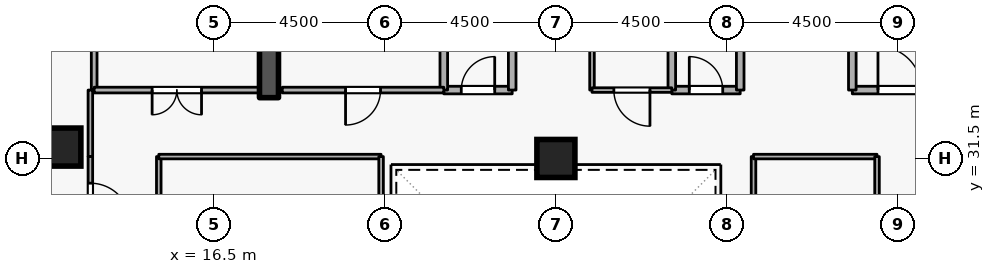
"""IFC4 building model, lengths in metres.
Left out: names, types, materials, properties, quantities, classifications, styles, units other than length and angle.
Written with IfcOpenShell. Run it as: python <this file> out.ifc"""

import sys

from ifc_helpers import new_model, si_unit, direction, frame, frame_2d, origin, origin_2d, place, context, subcontext, project, spatial, rectangle, extrude, element, fill, save


model = new_model("IFC4")
c1 = context("Model", 3, precision=1e-05, world=origin(), true_north=direction((0.0, 1.0)))
c2 = subcontext(c1, "Body", "Model", "MODEL_VIEW")
j1 = project(units=[si_unit("LENGTHUNIT", "METRE"), si_unit("PLANEANGLEUNIT", "RADIAN")], contexts=[c1])
p1 = place(None, origin())
s1 = spatial("IfcSite", under=j1, at=p1, CompositionType="ELEMENT")
p2 = place(p1, origin())
s2 = spatial("IfcBuilding", under=s1, at=p2, CompositionType="ELEMENT")
p3 = place(p2, frame((0.0, 0.0, 236.7)))
s3 = spatial("IfcBuildingStorey", under=s2, at=p3, CompositionType="ELEMENT", Elevation=236.7)
p4 = place(p3, frame((17.95, 33.1, 0.0), z_axis=(0.0, 0.0, 1.0), x_axis=(0.0, 1.0, 0.0)))
e1 = element("IfcWall", 1, at=p4, inside=s3, PredefinedType="SHEAR", context=c2, shape_type="SweptSolid", body=[
    extrude(rectangle(XDim=5.8, YDim=0.5, at=frame_2d((2.9, 0.0))), origin(), (0.0, 0.0, 1.0), 3.6),
])
for number, where, z_axis, x_axis in (
    (2, (12.5, 31.8, 0.0), (0.0, 0.0, 1.0), (1.0, 0.0, 0.0)),
    (3, (25.5, 31.5, 0.0), (0.0, 0.0, 1.0), (1.0, 0.0, 0.0)),
):
    element("IfcColumn", number, at=place(p3, frame(where, z_axis=z_axis, x_axis=x_axis)), inside=s3, PredefinedType="COLUMN", context=c2, shape_type="SweptSolid", body=[
        extrude(rectangle(XDim=1.0, YDim=1.0, at=origin_2d()), origin(), (0.0, 0.0, 1.0), 3.6),
    ])
p5 = place(p3, frame((33.3, 33.3, 0.0), z_axis=(0.0, 0.0, 1.0), x_axis=(1.0, 0.0, 0.0)))
e4 = element("IfcWall", 4, at=p5, inside=s3, PredefinedType="STANDARD", context=c2, shape_type="SweptSolid", body=[
    extrude(rectangle(XDim=2.5, YDim=0.2, at=frame_2d((1.25, 0.0))), origin(), (0.0, 0.0, 1.0), 3.34),
])
p6 = place(p5, frame((0.675, 0.0, 0.0)))
e5 = element("IfcOpeningElement", 5, at=p6, cuts=e4, PredefinedType="OPENING", context=c2, shape_type="SweptSolid", body=[
    extrude(rectangle(XDim=1.15, YDim=2.1, at=frame_2d((0.575, 1.05))), frame((0.0, 0.11, 0.0), z_axis=(0.0, -1.0, 0.0), x_axis=(1.0, 0.0, 0.0)), (0.0, 0.0, 1.0), 0.22),
])
p7 = place(p3, frame((33.3, 35.6, 0.0), z_axis=(0.0, 0.0, 1.0), x_axis=(0.0, -1.0, 0.0)))
e6 = element("IfcWall", 6, at=p7, inside=s3, PredefinedType="STANDARD", context=c2, shape_type="SweptSolid", body=[
    extrude(rectangle(XDim=2.3, YDim=0.2, at=frame_2d((1.15, 0.0))), origin(), (0.0, 0.0, 1.0), 2.545),
])
p8 = place(p3, frame((22.55, 33.3, 0.0), z_axis=(0.0, 0.0, 1.0), x_axis=(1.0, 0.0, 0.0)))
e7 = element("IfcWall", 7, at=p8, inside=s3, PredefinedType="STANDARD", context=c2, shape_type="SweptSolid", body=[
    extrude(rectangle(XDim=1.8, YDim=0.2, at=frame_2d((0.9, 0.0))), origin(), (0.0, 0.0, 1.0), 3.34),
])
p9 = place(p8, frame((0.46, 0.0, 0.0)))
e8 = element("IfcOpeningElement", 8, at=p9, cuts=e7, PredefinedType="OPENING", context=c2, shape_type="SweptSolid", body=[
    extrude(rectangle(XDim=0.88, YDim=2.04, at=frame_2d((0.44, 1.02))), frame((0.0, 0.11, 0.0), z_axis=(0.0, -1.0, 0.0), x_axis=(1.0, 0.0, 0.0)), (0.0, 0.0, 1.0), 0.22),
])
for number, where, z_axis, x_axis in (
    (9, (24.35, 33.3, 0.0), (0.0, 0.0, 1.0), (0.0, 1.0, 0.0)),
    (10, (22.55, 35.35, 0.0), (0.0, 0.0, 1.0), (0.0, -1.0, 0.0)),
):
    element("IfcWall", number, at=place(p3, frame(where, z_axis=z_axis, x_axis=x_axis)), inside=s3, PredefinedType="STANDARD", context=c2, shape_type="SweptSolid", body=[
        extrude(rectangle(XDim=2.05, YDim=0.2, at=frame_2d((1.025, 0.0))), origin(), (0.0, 0.0, 1.0), 3.34),
    ])
p10 = place(p3, frame((28.55, 33.3, 0.0), z_axis=(0.0, 0.0, 1.0), x_axis=(1.0, 0.0, 0.0)))
e11 = element("IfcWall", 11, at=p10, inside=s3, PredefinedType="STANDARD", context=c2, shape_type="SweptSolid", body=[
    extrude(rectangle(XDim=1.8, YDim=0.2, at=frame_2d((0.9, 0.0))), origin(), (0.0, 0.0, 1.0), 3.34),
])
p11 = place(p10, frame((0.46, 0.0, 0.0)))
e12 = element("IfcOpeningElement", 12, at=p11, cuts=e11, PredefinedType="OPENING", context=c2, shape_type="SweptSolid", body=[
    extrude(rectangle(XDim=0.88, YDim=2.04, at=frame_2d((0.44, 1.02))), frame((0.0, 0.11, 0.0), z_axis=(0.0, -1.0, 0.0), x_axis=(1.0, 0.0, 0.0)), (0.0, 0.0, 1.0), 0.22),
])
for number, where, z_axis, x_axis in (
    (13, (30.35, 33.3, 0.0), (0.0, 0.0, 1.0), (0.0, 1.0, 0.0)),
    (14, (28.55, 35.35, 0.0), (0.0, 0.0, 1.0), (0.0, -1.0, 0.0)),
):
    element("IfcWall", number, at=place(p3, frame(where, z_axis=z_axis, x_axis=x_axis)), inside=s3, PredefinedType="STANDARD", context=c2, shape_type="SweptSolid", body=[
        extrude(rectangle(XDim=2.05, YDim=0.2, at=frame_2d((1.025, 0.0))), origin(), (0.0, 0.0, 1.0), 3.34),
    ])
p12 = place(p3, frame((22.55, 33.3, 0.0), z_axis=(0.0, 0.0, 1.0), x_axis=(-1.0, 0.0, 0.0)))
e15 = element("IfcWall", 15, at=p12, inside=s3, PredefinedType="PARTITIONING", context=c2, shape_type="SweptSolid", body=[
    extrude(rectangle(XDim=4.25, YDim=0.15, at=frame_2d((2.125, 0.0))), origin(), (0.0, 0.0, 1.0), 3.34),
])
p13 = place(p12, frame((1.665, 0.0, 0.0)))
e16 = element("IfcOpeningElement", 16, at=p13, cuts=e15, PredefinedType="OPENING", context=c2, shape_type="SweptSolid", body=[
    extrude(rectangle(XDim=0.92, YDim=2.08, at=frame_2d((0.46, 1.04))), frame((0.0, 0.085, 0.0), z_axis=(0.0, -1.0, 0.0), x_axis=(1.0, 0.0, 0.0)), (0.0, 0.0, 1.0), 0.17),
])
p14 = place(p3, frame((26.45, 33.3, 0.0), z_axis=(0.0, 0.0, 1.0), x_axis=(0.0, 1.0, 0.0)))
e17 = element("IfcWall", 17, at=p14, inside=s3, PredefinedType="PARTITIONING", context=c2, shape_type="SweptSolid", body=[
    extrude(rectangle(XDim=2.05, YDim=0.12, at=frame_2d((1.025, 0.0))), origin(), (0.0, 0.0, 1.0), 3.34),
])
p15 = place(p3, frame((28.55, 33.3, 0.0), z_axis=(0.0, 0.0, 1.0), x_axis=(-1.0, 0.0, 0.0)))
e18 = element("IfcWall", 18, at=p15, inside=s3, PredefinedType="PARTITIONING", context=c2, shape_type="SweptSolid", body=[
    extrude(rectangle(XDim=2.1, YDim=0.12, at=frame_2d((1.05, 0.0))), origin(), (0.0, 0.0, 1.0), 3.34),
])
p16 = place(p15, frame((0.575, 0.0, 0.0)))
e19 = element("IfcOpeningElement", 19, at=p16, cuts=e18, PredefinedType="OPENING", context=c2, shape_type="SweptSolid", body=[
    extrude(rectangle(XDim=0.95, YDim=2.1, at=frame_2d((0.475, 1.05))), frame((0.0, 0.07, 0.0), z_axis=(0.0, -1.0, 0.0), x_axis=(1.0, 0.0, 0.0)), (0.0, 0.0, 1.0), 0.14),
])
p17 = place(p3, frame((13.35, 33.3, 0.0), z_axis=(0.0, 0.0, 1.0), x_axis=(0.0, 1.0, 0.0)))
e20 = element("IfcWall", 20, at=p17, inside=s3, PredefinedType="PARTITIONING", context=c2, shape_type="SweptSolid", body=[
    extrude(rectangle(XDim=11.42, YDim=0.15, at=frame_2d((5.71, 0.0))), origin(), (0.0, 0.0, 1.0), 3.34),
])
p18 = place(p3, frame((17.7, 33.3, 0.0), z_axis=(0.0, 0.0, 1.0), x_axis=(-1.0, 0.0, 0.0)))
e21 = element("IfcWall", 21, at=p18, inside=s3, PredefinedType="PARTITIONING", context=c2, shape_type="SweptSolid", body=[
    extrude(rectangle(XDim=4.35, YDim=0.15, at=frame_2d((2.175, 0.0))), origin(), (0.0, 0.0, 1.0), 3.34),
])
p19 = place(p18, frame((1.525, 0.0, 0.0)))
e22 = element("IfcOpeningElement", 22, at=p19, cuts=e21, PredefinedType="OPENING", context=c2, shape_type="SweptSolid", body=[
    extrude(rectangle(XDim=1.3, YDim=2.12, at=frame_2d((0.65, 1.06))), frame((0.0, 0.085, 0.0), z_axis=(0.0, -1.0, 0.0), x_axis=(1.0, 0.0, 0.0)), (0.0, 0.0, 1.0), 0.17),
])
p20 = place(p3, frame((13.25, 33.3, 0.0), z_axis=(0.0, 0.0, 1.0), x_axis=(0.0, -1.0, 0.0)))
e23 = element("IfcWall", 23, at=p20, inside=s3, PredefinedType="PARTITIONING", context=c2, shape_type="SweptSolid", body=[
    extrude(rectangle(XDim=1.75, YDim=0.12, at=frame_2d((0.875, 0.0))), origin(), (0.0, 0.0, 1.0), 3.34),
])
p21 = place(p3, frame((13.25, 31.55, 0.0), z_axis=(0.0, 0.0, 1.0), x_axis=(0.0, -1.0, 0.0)))
e24 = element("IfcWall", 24, at=p21, inside=s3, PredefinedType="PARTITIONING", context=c2, shape_type="SweptSolid", body=[
    extrude(rectangle(XDim=2.45, YDim=0.12, at=frame_2d((1.225, 0.0))), origin(), (0.0, 0.0, 1.0), 3.34),
])
p22 = place(p21, frame((0.7, 0.0, 0.0)))
e25 = element("IfcOpeningElement", 25, at=p22, cuts=e24, PredefinedType="OPENING", context=c2, shape_type="SweptSolid", body=[
    extrude(rectangle(XDim=1.05, YDim=2.1, at=frame_2d((0.525, 1.05))), frame((0.0, 0.07, 0.0), z_axis=(0.0, -1.0, 0.0), x_axis=(1.0, 0.0, 0.0)), (0.0, 0.0, 1.0), 0.14),
])
p23 = place(p3, frame((15.05, 22.45, 0.0), z_axis=(0.0, 0.0, 1.0), x_axis=(0.0, 1.0, 0.0)))
e26 = element("IfcWall", 26, at=p23, inside=s3, PredefinedType="PARTITIONING", context=c2, shape_type="SweptSolid", body=[
    extrude(rectangle(XDim=9.1, YDim=0.12, at=frame_2d((4.55, 0.0))), origin(), (0.0, 0.0, 1.0), 3.34),
])
p24 = place(p23, frame((4.075, 0.0, 0.0)))
e27 = element("IfcOpeningElement", 27, at=p24, cuts=e26, PredefinedType="OPENING", context=c2, shape_type="SweptSolid", body=[
    extrude(rectangle(XDim=0.95, YDim=2.1, at=frame_2d((0.475, 1.05))), frame((0.0, 0.07, 0.0), z_axis=(0.0, -1.0, 0.0), x_axis=(1.0, 0.0, 0.0)), (0.0, 0.0, 1.0), 0.14),
])
p25 = place(p3, frame((15.05, 31.55, 0.0), z_axis=(0.0, 0.0, 1.0), x_axis=(1.0, 0.0, 0.0)))
e28 = element("IfcWall", 28, at=p25, inside=s3, PredefinedType="PARTITIONING", context=c2, shape_type="SweptSolid", body=[
    extrude(rectangle(XDim=5.85, YDim=0.12, at=frame_2d((2.925, 0.0))), origin(), (0.0, 0.0, 1.0), 3.34),
])
for number, where, z_axis, x_axis in (
    (29, (20.9, 31.55, 0.0), (0.0, 0.0, 1.0), (0.0, -1.0, 0.0)),
    (30, (30.7, 22.45, 0.0), (0.0, 0.0, 1.0), (0.0, 1.0, 0.0)),
):
    element("IfcWall", number, at=place(p3, frame(where, z_axis=z_axis, x_axis=x_axis)), inside=s3, PredefinedType="PARTITIONING", context=c2, shape_type="SweptSolid", body=[
        extrude(rectangle(XDim=9.1, YDim=0.12, at=frame_2d((4.55, 0.0))), origin(), (0.0, 0.0, 1.0), 3.34),
    ])
p26 = place(p3, frame((30.7, 31.55, 0.0), z_axis=(0.0, 0.0, 1.0), x_axis=(1.0, 0.0, 0.0)))
e31 = element("IfcWall", 31, at=p26, inside=s3, PredefinedType="PARTITIONING", context=c2, shape_type="SweptSolid", body=[
    extrude(rectangle(XDim=3.25, YDim=0.12, at=frame_2d((1.625, 0.0))), origin(), (0.0, 0.0, 1.0), 3.34),
])
p27 = place(p3, frame((33.95, 31.55, 0.0), z_axis=(0.0, 0.0, 1.0), x_axis=(0.0, -1.0, 0.0)))
e32 = element("IfcWall", 32, at=p27, inside=s3, PredefinedType="PARTITIONING", context=c2, shape_type="SweptSolid", body=[
    extrude(rectangle(XDim=9.1, YDim=0.12, at=frame_2d((4.55, 0.0))), origin(), (0.0, 0.0, 1.0), 3.34),
])
p28 = place(p27, frame((4.075, 0.0, 0.0)))
e33 = element("IfcOpeningElement", 33, at=p28, cuts=e32, PredefinedType="OPENING", context=c2, shape_type="SweptSolid", body=[
    extrude(rectangle(XDim=0.95, YDim=2.1, at=frame_2d((0.475, 1.05))), frame((0.0, 0.07, 0.0), z_axis=(0.0, -1.0, 0.0), x_axis=(1.0, 0.0, 0.0)), (0.0, 0.0, 1.0), 0.14),
])
p29 = place(p6, origin())
e34 = element("IfcDoor", 34, at=p29, inside=s3, OperationType="SINGLE_SWING_LEFT", PredefinedType="DOOR", context=c2, shape_type="SweptSolid", body=[
    extrude(rectangle(XDim=1.15, YDim=2.1, at=frame_2d((0.575, 1.05))), frame((0.0, 0.025, 0.0), z_axis=(0.0, -1.0, 0.0), x_axis=(1.0, 0.0, 0.0)), (0.0, 0.0, 1.0), 0.05),
])
fill(e5, e34)
p30 = place(p9, origin())
e35 = element("IfcDoor", 35, at=p30, inside=s3, OperationType="SINGLE_SWING_RIGHT", PredefinedType="DOOR", context=c2, shape_type="SweptSolid", body=[
    extrude(rectangle(XDim=0.88, YDim=2.04, at=frame_2d((0.44, 1.02))), frame((0.0, 0.025, 0.0), z_axis=(0.0, -1.0, 0.0), x_axis=(1.0, 0.0, 0.0)), (0.0, 0.0, 1.0), 0.05),
])
fill(e8, e35)
p31 = place(p11, origin())
e36 = element("IfcDoor", 36, at=p31, inside=s3, OperationType="SINGLE_SWING_LEFT", PredefinedType="DOOR", context=c2, shape_type="SweptSolid", body=[
    extrude(rectangle(XDim=0.88, YDim=2.04, at=frame_2d((0.44, 1.02))), frame((0.0, 0.025, 0.0), z_axis=(0.0, -1.0, 0.0), x_axis=(1.0, 0.0, 0.0)), (0.0, 0.0, 1.0), 0.05),
])
fill(e12, e36)
p32 = place(p13, origin())
e37 = element("IfcDoor", 37, at=p32, inside=s3, OperationType="SINGLE_SWING_RIGHT", PredefinedType="DOOR", context=c2, shape_type="SweptSolid", body=[
    extrude(rectangle(XDim=0.92, YDim=2.08, at=frame_2d((0.46, 1.04))), frame((0.0, 0.025, 0.0), z_axis=(0.0, -1.0, 0.0), x_axis=(1.0, 0.0, 0.0)), (0.0, 0.0, 1.0), 0.05),
])
fill(e16, e37)
p33 = place(p16, origin())
e38 = element("IfcDoor", 38, at=p33, inside=s3, OperationType="SINGLE_SWING_LEFT", PredefinedType="DOOR", context=c2, shape_type="SweptSolid", body=[
    extrude(rectangle(XDim=0.95, YDim=2.1, at=frame_2d((0.475, 1.05))), frame((0.0, 0.025, 0.0), z_axis=(0.0, -1.0, 0.0), x_axis=(1.0, 0.0, 0.0)), (0.0, 0.0, 1.0), 0.05),
])
fill(e19, e38)
p34 = place(p19, origin())
e39 = element("IfcDoor", 39, at=p34, inside=s3, OperationType="DOUBLE_DOOR_SINGLE_SWING", PredefinedType="DOOR", context=c2, shape_type="SweptSolid", body=[
    extrude(rectangle(XDim=1.3, YDim=2.12, at=frame_2d((0.65, 1.06))), frame((0.0, 0.025, 0.0), z_axis=(0.0, -1.0, 0.0), x_axis=(1.0, 0.0, 0.0)), (0.0, 0.0, 1.0), 0.05),
])
fill(e22, e39)
p35 = place(p22, origin())
e40 = element("IfcDoor", 40, at=p35, inside=s3, OperationType="SINGLE_SWING_RIGHT", PredefinedType="DOOR", context=c2, shape_type="SweptSolid", body=[
    extrude(rectangle(XDim=1.05, YDim=2.1, at=frame_2d((0.525, 1.05))), frame((0.0, 0.025, 0.0), z_axis=(0.0, -1.0, 0.0), x_axis=(1.0, 0.0, 0.0)), (0.0, 0.0, 1.0), 0.05),
])
fill(e25, e40)
save(model, sys.argv[1])
